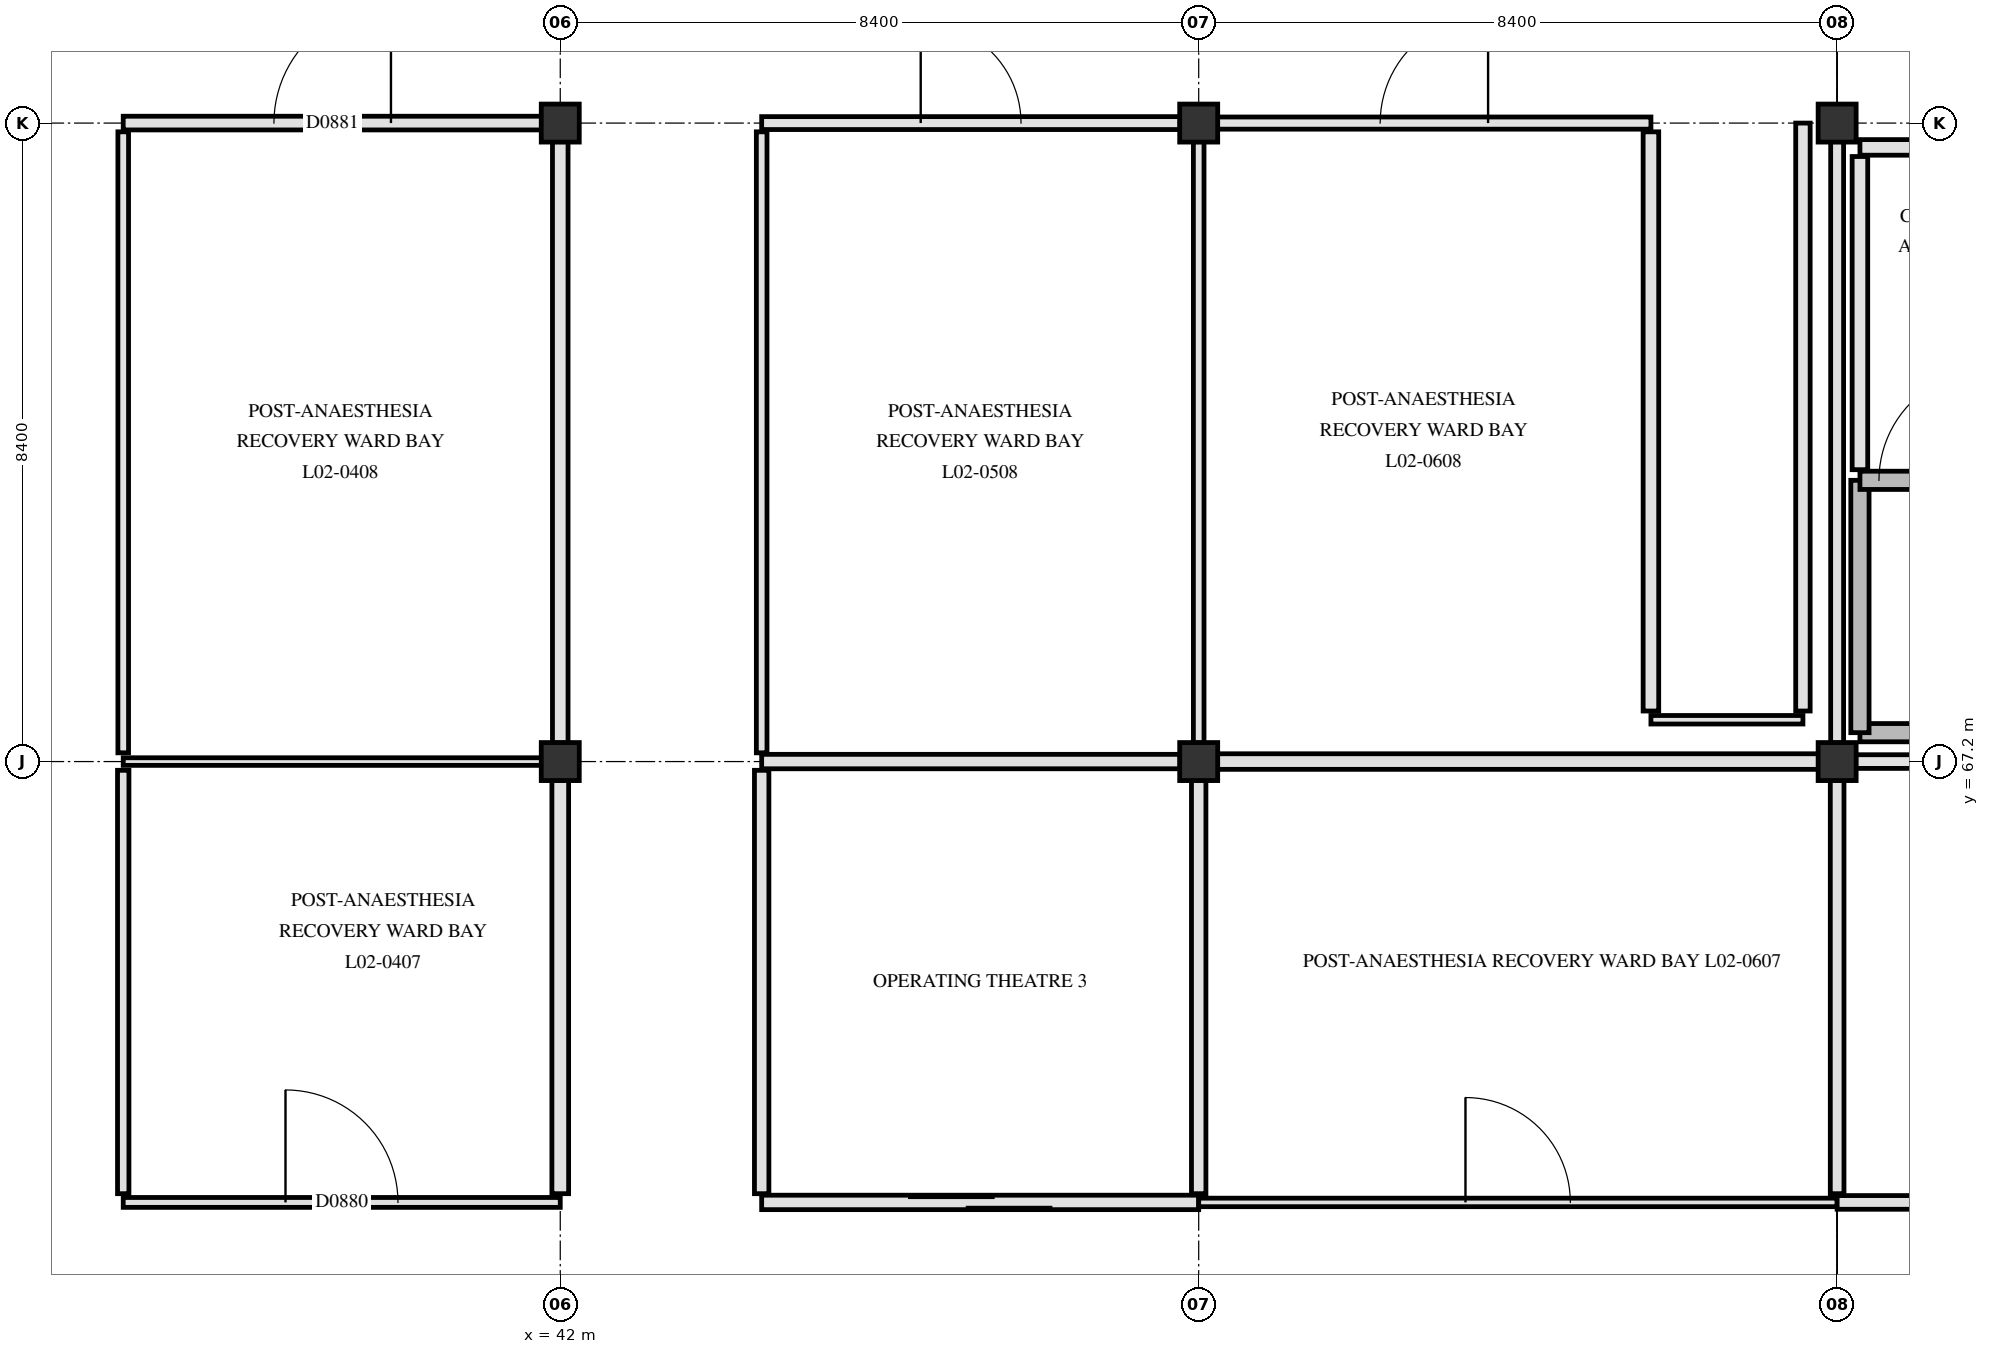
"""IFC4 building model, lengths in metres.
Left out: names, types, materials, properties, quantities, classifications, styles, units other than length and angle.
Written with IfcOpenShell. Run it as: python <this file> out.ifc"""

import sys

from ifc_helpers import new_model, si_unit, direction, frame, frame_2d, origin, origin_2d, place, context, subcontext, project, spatial, rectangle, extrude, element, fill, save


model = new_model("IFC4")
c1 = context("Model", 3, precision=1e-05, world=origin(), true_north=direction((0.0, 1.0)))
c2 = subcontext(c1, "Body", "Model", "MODEL_VIEW")
j1 = project(units=[si_unit("LENGTHUNIT", "METRE"), si_unit("PLANEANGLEUNIT", "RADIAN")], contexts=[c1])
p1 = place(None, origin())
s1 = spatial("IfcSite", under=j1, at=p1, CompositionType="ELEMENT")
p2 = place(p1, origin())
s2 = spatial("IfcBuilding", under=s1, at=p2, CompositionType="ELEMENT")
p3 = place(p2, frame((0.0, 0.0, 9.3)))
s3 = spatial("IfcBuildingStorey", under=s2, at=p3, CompositionType="ELEMENT", Elevation=9.3)
for number, where, z_axis, x_axis in (
    (1, (42.0, 67.2, 0.0), (0.0, 0.0, 1.0), (1.0, 0.0, 0.0)),
    (2, (42.0, 75.6, 0.0), (0.0, 0.0, 1.0), (1.0, 0.0, 0.0)),
    (3, (50.4, 67.2, 0.0), (0.0, 0.0, 1.0), (1.0, 0.0, 0.0)),
    (4, (50.4, 75.6, 0.0), (0.0, 0.0, 1.0), (1.0, 0.0, 0.0)),
    (5, (58.8, 67.2, 0.0), (0.0, 0.0, 1.0), (1.0, 0.0, 0.0)),
    (6, (58.8, 75.6, 0.0), (0.0, 0.0, 1.0), (1.0, 0.0, 0.0)),
):
    element("IfcColumn", number, at=place(p3, frame(where, z_axis=z_axis, x_axis=x_axis)), inside=s3, PredefinedType="COLUMN", context=c2, shape_type="SweptSolid", body=[
        extrude(rectangle(XDim=0.5, YDim=0.5, at=origin_2d()), origin(), (0.0, 0.0, 1.0), 5.1),
    ])
p4 = place(p3, frame((59.1, 67.58, 0.0), z_axis=(0.0, 0.0, 1.0), x_axis=(1.0, 0.0, 0.0)))
e7 = element("IfcWall", 7, at=p4, inside=s3, PredefinedType="SHEAR", context=c2, shape_type="SweptSolid", body=[
    extrude(rectangle(XDim=7.82, YDim=0.24, at=frame_2d((3.91, 0.0))), origin(), (0.0, 0.0, 1.0), 4.78),
])
p5 = place(p3, frame((59.1, 67.58, 0.0), z_axis=(0.0, 0.0, 1.0), x_axis=(0.0, 1.0, 0.0)))
e8 = element("IfcWall", 8, at=p5, inside=s3, PredefinedType="SHEAR", context=c2, shape_type="SweptSolid", body=[
    extrude(rectangle(XDim=3.32, YDim=0.24, at=frame_2d((1.66, 0.0))), origin(), (0.0, 0.0, 1.0), 4.78),
])
p6 = place(p3, frame((59.1, 70.9, 0.0), z_axis=(0.0, 0.0, 1.0), x_axis=(1.0, 0.0, 0.0)))
e9 = element("IfcWall", 9, at=p6, inside=s3, PredefinedType="SHEAR", context=c2, shape_type="SweptSolid", body=[
    extrude(rectangle(XDim=7.82, YDim=0.24, at=frame_2d((3.91, 0.0))), origin(), (0.0, 0.0, 1.0), 4.78),
])
p7 = place(p6, frame((0.25, 0.0, 0.0)))
e10 = element("IfcOpeningElement", 10, at=p7, cuts=e9, PredefinedType="OPENING", context=c2, shape_type="SweptSolid", body=[
    extrude(rectangle(XDim=1.45, YDim=2.2, at=frame_2d((0.725, 1.1))), frame((0.0, 0.13, 0.0), z_axis=(0.0, -1.0, 0.0), x_axis=(1.0, 0.0, 0.0)), (0.0, 0.0, 1.0), 0.26),
])
p8 = place(p3, frame((59.1, 71.04, 0.0), z_axis=(0.0, 0.0, 1.0), x_axis=(0.0, 1.0, 0.0)))
e11 = element("IfcWall", 11, at=p8, inside=s3, PredefinedType="PARTITIONING", context=c2, shape_type="SweptSolid", body=[
    extrude(rectangle(XDim=4.12, YDim=0.205, at=frame_2d((2.06, 0.0))), origin(), (0.0, 0.0, 1.0), 4.17),
])
p9 = place(p3, frame((59.1, 75.28, 0.0), z_axis=(0.0, 0.0, 1.0), x_axis=(1.0, 0.0, 0.0)))
e12 = element("IfcWall", 12, at=p9, inside=s3, PredefinedType="PARTITIONING", context=c2, shape_type="SweptSolid", body=[
    extrude(rectangle(XDim=4.18, YDim=0.205, at=frame_2d((2.09, 0.0))), origin(), (0.0, 0.0, 1.0), 4.17),
])
p10 = place(p9, frame((1.29, 0.0, 0.0)))
e13 = element("IfcOpeningElement", 13, at=p10, cuts=e12, PredefinedType="OPENING", context=c2, shape_type="SweptSolid", body=[
    extrude(rectangle(XDim=1.6, YDim=2.25, at=frame_2d((0.8, 1.125))), frame((0.0, 0.113, 0.0), z_axis=(0.0, -1.0, 0.0), x_axis=(1.0, 0.0, 0.0)), (0.0, 0.0, 1.0), 0.225),
])
p11 = place(p3, frame((36.25, 61.4, 0.0), z_axis=(0.0, 0.0, 1.0), x_axis=(1.0, 0.0, 0.0)))
e14 = element("IfcWall", 14, at=p11, inside=s3, PredefinedType="PARTITIONING", context=c2, shape_type="SweptSolid", body=[
    extrude(rectangle(XDim=5.75, YDim=0.13, at=frame_2d((2.875, 0.0))), origin(), (0.0, 0.0, 1.0), 4.17),
])
p12 = place(p11, frame((2.135, 0.0, 0.0)))
e15 = element("IfcOpeningElement", 15, at=p12, cuts=e14, PredefinedType="OPENING", context=c2, shape_type="SweptSolid", body=[
    extrude(rectangle(XDim=1.48, YDim=2.22, at=frame_2d((0.74, 1.11))), frame((0.0, 0.075, 0.0), z_axis=(0.0, -1.0, 0.0), x_axis=(1.0, 0.0, 0.0)), (0.0, 0.0, 1.0), 0.15),
])
p13 = place(p3, frame((44.65, 61.4, 0.0), z_axis=(0.0, 0.0, 1.0), x_axis=(1.0, 0.0, 0.0)))
e16 = element("IfcWall", 16, at=p13, inside=s3, PredefinedType="PARTITIONING", context=c2, shape_type="SweptSolid", body=[
    extrude(rectangle(XDim=5.75, YDim=0.19, at=frame_2d((2.875, 0.0))), origin(), (0.0, 0.0, 1.0), 4.17),
])
p14 = place(p13, frame((1.925, 0.0, 0.0)))
e17 = element("IfcOpeningElement", 17, at=p14, cuts=e16, PredefinedType="OPENING", context=c2, shape_type="SweptSolid", body=[
    extrude(rectangle(XDim=1.9, YDim=2.3, at=frame_2d((0.95, 1.15))), frame((0.0, 0.105, 0.0), z_axis=(0.0, -1.0, 0.0), x_axis=(1.0, 0.0, 0.0)), (0.0, 0.0, 1.0), 0.21),
])
p15 = place(p3, frame((50.4, 61.4, 0.0), z_axis=(0.0, 0.0, 1.0), x_axis=(1.0, 0.0, 0.0)))
e18 = element("IfcWall", 18, at=p15, inside=s3, PredefinedType="PARTITIONING", context=c2, shape_type="SweptSolid", body=[
    extrude(rectangle(XDim=8.4, YDim=0.112, at=frame_2d((4.2, 0.0))), origin(), (0.0, 0.0, 1.0), 4.17),
])
p16 = place(p15, frame((3.51, 0.0, 0.0)))
e19 = element("IfcOpeningElement", 19, at=p16, cuts=e18, PredefinedType="OPENING", context=c2, shape_type="SweptSolid", body=[
    extrude(rectangle(XDim=1.38, YDim=2.22, at=frame_2d((0.69, 1.11))), frame((0.0, 0.066, 0.0), z_axis=(0.0, -1.0, 0.0), x_axis=(1.0, 0.0, 0.0)), (0.0, 0.0, 1.0), 0.132),
])
p17 = place(p3, frame((58.8, 61.4, 0.0), z_axis=(0.0, 0.0, 1.0), x_axis=(1.0, 0.0, 0.0)))
e20 = element("IfcWall", 20, at=p17, inside=s3, PredefinedType="PARTITIONING", context=c2, shape_type="SweptSolid", body=[
    extrude(rectangle(XDim=8.4, YDim=0.18, at=frame_2d((4.2, 0.0))), origin(), (0.0, 0.0, 1.0), 4.17),
])
p18 = place(p17, frame((3.4, 0.0, 0.0)))
e21 = element("IfcOpeningElement", 21, at=p18, cuts=e20, PredefinedType="OPENING", context=c2, shape_type="SweptSolid", body=[
    extrude(rectangle(XDim=1.6, YDim=2.25, at=frame_2d((0.8, 1.125))), frame((0.0, 0.1, 0.0), z_axis=(0.0, -1.0, 0.0), x_axis=(1.0, 0.0, 0.0)), (0.0, 0.0, 1.0), 0.2),
])
p19 = place(p3, frame((36.25, 67.2, 0.0), z_axis=(0.0, 0.0, 1.0), x_axis=(1.0, 0.0, 0.0)))
e22 = element("IfcWall", 22, at=p19, inside=s3, PredefinedType="PARTITIONING", context=c2, shape_type="SweptSolid", body=[
    extrude(rectangle(XDim=5.505, YDim=0.1, at=frame_2d((2.752, 0.0))), origin(), (0.0, 0.0, 1.0), 4.02),
])
p20 = place(p3, frame((44.65, 67.2, 0.0), z_axis=(0.0, 0.0, 1.0), x_axis=(1.0, 0.0, 0.0)))
e23 = element("IfcWall", 23, at=p20, inside=s3, PredefinedType="PARTITIONING", context=c2, shape_type="SweptSolid", body=[
    extrude(rectangle(XDim=5.505, YDim=0.19, at=frame_2d((2.752, 0.0))), origin(), (0.0, 0.0, 1.0), 4.02),
])
p21 = place(p3, frame((50.645, 67.2, 0.0), z_axis=(0.0, 0.0, 1.0), x_axis=(1.0, 0.0, 0.0)))
e24 = element("IfcWall", 24, at=p21, inside=s3, PredefinedType="PARTITIONING", context=c2, shape_type="SweptSolid", body=[
    extrude(rectangle(XDim=7.91, YDim=0.205, at=frame_2d((3.955, 0.0))), origin(), (0.0, 0.0, 1.0), 4.02),
])
p22 = place(p3, frame((59.045, 67.2, 0.0), z_axis=(0.0, 0.0, 1.0), x_axis=(1.0, 0.0, 0.0)))
e25 = element("IfcWall", 25, at=p22, inside=s3, PredefinedType="PARTITIONING", context=c2, shape_type="SweptSolid", body=[
    extrude(rectangle(XDim=7.91, YDim=0.18, at=frame_2d((3.955, 0.0))), origin(), (0.0, 0.0, 1.0), 4.17),
])
p23 = place(p3, frame((56.35, 67.75, 0.0), z_axis=(0.0, 0.0, 1.0), x_axis=(1.0, 0.0, 0.0)))
e26 = element("IfcWall", 26, at=p23, inside=s3, PredefinedType="PARTITIONING", context=c2, shape_type="SweptSolid", body=[
    extrude(rectangle(XDim=2.0, YDim=0.112, at=frame_2d((1.0, 0.0))), origin(), (0.0, 0.0, 1.0), 4.77),
])
p24 = place(p3, frame((36.25, 75.6, 0.0), z_axis=(0.0, 0.0, 1.0), x_axis=(1.0, 0.0, 0.0)))
e27 = element("IfcWall", 27, at=p24, inside=s3, PredefinedType="PARTITIONING", context=c2, shape_type="SweptSolid", body=[
    extrude(rectangle(XDim=5.505, YDim=0.18, at=frame_2d((2.752, 0.0))), origin(), (0.0, 0.0, 1.0), 4.02),
])
p25 = place(p24, frame((1.982, 0.0, 0.0)))
e28 = element("IfcOpeningElement", 28, at=p25, cuts=e27, PredefinedType="OPENING", context=c2, shape_type="SweptSolid", body=[
    extrude(rectangle(XDim=1.54, YDim=2.24, at=frame_2d((0.77, 1.12))), frame((0.0, 0.1, 0.0), z_axis=(0.0, -1.0, 0.0), x_axis=(1.0, 0.0, 0.0)), (0.0, 0.0, 1.0), 0.2),
])
p26 = place(p3, frame((44.65, 75.6, 0.0), z_axis=(0.0, 0.0, 1.0), x_axis=(1.0, 0.0, 0.0)))
e29 = element("IfcWall", 29, at=p26, inside=s3, PredefinedType="PARTITIONING", context=c2, shape_type="SweptSolid", body=[
    extrude(rectangle(XDim=5.505, YDim=0.17, at=frame_2d((2.752, 0.0))), origin(), (0.0, 0.0, 1.0), 4.02),
])
p27 = place(p26, frame((2.093, 0.0, 0.0)))
e30 = element("IfcOpeningElement", 30, at=p27, cuts=e29, PredefinedType="OPENING", context=c2, shape_type="SweptSolid", body=[
    extrude(rectangle(XDim=1.32, YDim=2.18, at=frame_2d((0.66, 1.09))), frame((0.0, 0.095, 0.0), z_axis=(0.0, -1.0, 0.0), x_axis=(1.0, 0.0, 0.0)), (0.0, 0.0, 1.0), 0.19),
])
p28 = place(p3, frame((50.645, 75.6, 0.0), z_axis=(0.0, 0.0, 1.0), x_axis=(1.0, 0.0, 0.0)))
e31 = element("IfcWall", 31, at=p28, inside=s3, PredefinedType="PARTITIONING", context=c2, shape_type="SweptSolid", body=[
    extrude(rectangle(XDim=5.705, YDim=0.16, at=frame_2d((2.853, 0.0))), origin(), (0.0, 0.0, 1.0), 4.02),
])
p29 = place(p28, frame((2.143, 0.0, 0.0)))
e32 = element("IfcOpeningElement", 32, at=p29, cuts=e31, PredefinedType="OPENING", context=c2, shape_type="SweptSolid", body=[
    extrude(rectangle(XDim=1.42, YDim=2.22, at=frame_2d((0.71, 1.11))), frame((0.0, 0.09, 0.0), z_axis=(0.0, -1.0, 0.0), x_axis=(1.0, 0.0, 0.0)), (0.0, 0.0, 1.0), 0.18),
])
p30 = place(p3, frame((36.25, 61.515, 0.0), z_axis=(0.0, 0.0, 1.0), x_axis=(0.0, 1.0, 0.0)))
e33 = element("IfcWall", 33, at=p30, inside=s3, PredefinedType="PARTITIONING", context=c2, shape_type="SweptSolid", body=[
    extrude(rectangle(XDim=5.57, YDim=0.15, at=frame_2d((2.785, 0.0))), origin(), (0.0, 0.0, 1.0), 4.02),
])
p31 = place(p3, frame((36.25, 67.315, 0.0), z_axis=(0.0, 0.0, 1.0), x_axis=(0.0, 1.0, 0.0)))
e34 = element("IfcWall", 34, at=p31, inside=s3, PredefinedType="PARTITIONING", context=c2, shape_type="SweptSolid", body=[
    extrude(rectangle(XDim=8.17, YDim=0.14, at=frame_2d((4.085, 0.0))), origin(), (0.0, 0.0, 1.0), 4.02),
])
p32 = place(p3, frame((42.0, 61.515, 0.0), z_axis=(0.0, 0.0, 1.0), x_axis=(0.0, 1.0, 0.0)))
e35 = element("IfcWall", 35, at=p32, inside=s3, PredefinedType="PARTITIONING", context=c2, shape_type="SweptSolid", body=[
    extrude(rectangle(XDim=5.44, YDim=0.22, at=frame_2d((2.72, 0.0))), origin(), (0.0, 0.0, 1.0), 4.17),
])
p33 = place(p3, frame((42.0, 67.445, 0.0), z_axis=(0.0, 0.0, 1.0), x_axis=(0.0, 1.0, 0.0)))
e36 = element("IfcWall", 36, at=p33, inside=s3, PredefinedType="PARTITIONING", context=c2, shape_type="SweptSolid", body=[
    extrude(rectangle(XDim=7.91, YDim=0.205, at=frame_2d((3.955, 0.0))), origin(), (0.0, 0.0, 1.0), 4.17),
])
p34 = place(p3, frame((44.65, 61.515, 0.0), z_axis=(0.0, 0.0, 1.0), x_axis=(0.0, 1.0, 0.0)))
e37 = element("IfcWall", 37, at=p34, inside=s3, PredefinedType="PARTITIONING", context=c2, shape_type="SweptSolid", body=[
    extrude(rectangle(XDim=5.57, YDim=0.19, at=frame_2d((2.785, 0.0))), origin(), (0.0, 0.0, 1.0), 4.02),
])
p35 = place(p3, frame((44.65, 67.315, 0.0), z_axis=(0.0, 0.0, 1.0), x_axis=(0.0, 1.0, 0.0)))
e38 = element("IfcWall", 38, at=p35, inside=s3, PredefinedType="PARTITIONING", context=c2, shape_type="SweptSolid", body=[
    extrude(rectangle(XDim=8.17, YDim=0.14, at=frame_2d((4.085, 0.0))), origin(), (0.0, 0.0, 1.0), 4.02),
])
p36 = place(p3, frame((50.4, 61.515, 0.0), z_axis=(0.0, 0.0, 1.0), x_axis=(0.0, 1.0, 0.0)))
e39 = element("IfcWall", 39, at=p36, inside=s3, PredefinedType="PARTITIONING", context=c2, shape_type="SweptSolid", body=[
    extrude(rectangle(XDim=5.44, YDim=0.19, at=frame_2d((2.72, 0.0))), origin(), (0.0, 0.0, 1.0), 4.17),
])
p37 = place(p3, frame((50.4, 67.445, 0.0), z_axis=(0.0, 0.0, 1.0), x_axis=(0.0, 1.0, 0.0)))
e40 = element("IfcWall", 40, at=p37, inside=s3, PredefinedType="PARTITIONING", context=c2, shape_type="SweptSolid", body=[
    extrude(rectangle(XDim=7.91, YDim=0.14, at=frame_2d((3.955, 0.0))), origin(), (0.0, 0.0, 1.0), 4.17),
])
p38 = place(p3, frame((56.35, 67.865, 0.0), z_axis=(0.0, 0.0, 1.0), x_axis=(0.0, 1.0, 0.0)))
e41 = element("IfcWall", 41, at=p38, inside=s3, PredefinedType="PARTITIONING", context=c2, shape_type="SweptSolid", body=[
    extrude(rectangle(XDim=7.62, YDim=0.205, at=frame_2d((3.81, 0.0))), origin(), (0.0, 0.0, 1.0), 4.02),
])
p39 = place(p3, frame((58.35, 67.865, 0.0), z_axis=(0.0, 0.0, 1.0), x_axis=(0.0, 1.0, 0.0)))
e42 = element("IfcWall", 42, at=p39, inside=s3, PredefinedType="PARTITIONING", context=c2, shape_type="SweptSolid", body=[
    extrude(rectangle(XDim=7.735, YDim=0.19, at=frame_2d((3.868, 0.0))), origin(), (0.0, 0.0, 1.0), 4.02),
])
p40 = place(p3, frame((58.8, 61.515, 0.0), z_axis=(0.0, 0.0, 1.0), x_axis=(0.0, 1.0, 0.0)))
e43 = element("IfcWall", 43, at=p40, inside=s3, PredefinedType="PARTITIONING", context=c2, shape_type="SweptSolid", body=[
    extrude(rectangle(XDim=5.44, YDim=0.18, at=frame_2d((2.72, 0.0))), origin(), (0.0, 0.0, 1.0), 4.17),
])
p41 = place(p3, frame((58.8, 67.445, 0.0), z_axis=(0.0, 0.0, 1.0), x_axis=(0.0, 1.0, 0.0)))
e44 = element("IfcWall", 44, at=p41, inside=s3, PredefinedType="PARTITIONING", context=c2, shape_type="SweptSolid", body=[
    extrude(rectangle(XDim=7.91, YDim=0.17, at=frame_2d((3.955, 0.0))), origin(), (0.0, 0.0, 1.0), 4.17),
])
p42 = place(p7, origin())
e45 = element("IfcDoor", 45, at=p42, inside=s3, OperationType="SINGLE_SWING_RIGHT", PredefinedType="DOOR", context=c2, shape_type="SweptSolid", body=[
    extrude(rectangle(XDim=1.45, YDim=2.2, at=frame_2d((0.725, 1.1))), frame((0.0, 0.025, 0.0), z_axis=(0.0, -1.0, 0.0), x_axis=(1.0, 0.0, 0.0)), (0.0, 0.0, 1.0), 0.05),
])
fill(e10, e45)
p43 = place(p12, origin())
e46 = element("IfcDoor", 46, at=p43, inside=s3, OperationType="SINGLE_SWING_LEFT", PredefinedType="DOOR", context=c2, shape_type="SweptSolid", body=[
    extrude(rectangle(XDim=1.48, YDim=2.22, at=frame_2d((0.74, 1.11))), frame((0.0, 0.025, 0.0), z_axis=(0.0, -1.0, 0.0), x_axis=(1.0, 0.0, 0.0)), (0.0, 0.0, 1.0), 0.05),
])
fill(e15, e46)
p44 = place(p25, origin())
e47 = element("IfcDoor", 47, at=p44, inside=s3, OperationType="SINGLE_SWING_RIGHT", PredefinedType="DOOR", context=c2, shape_type="SweptSolid", body=[
    extrude(rectangle(XDim=1.54, YDim=2.24, at=frame_2d((0.77, 1.12))), frame((0.0, 0.025, 0.0), z_axis=(0.0, -1.0, 0.0), x_axis=(1.0, 0.0, 0.0)), (0.0, 0.0, 1.0), 0.05),
])
fill(e28, e47)
p45 = place(p14, origin())
e48 = element("IfcDoor", 48, at=p45, inside=s3, OperationType="SLIDING_TO_LEFT", PredefinedType="DOOR", context=c2, shape_type="SweptSolid", body=[
    extrude(rectangle(XDim=1.9, YDim=2.3, at=frame_2d((0.95, 1.15))), frame((0.0, 0.025, 0.0), z_axis=(0.0, -1.0, 0.0), x_axis=(1.0, 0.0, 0.0)), (0.0, 0.0, 1.0), 0.05),
])
fill(e17, e48)
p46 = place(p27, origin())
e49 = element("IfcDoor", 49, at=p46, inside=s3, OperationType="SINGLE_SWING_LEFT", PredefinedType="DOOR", context=c2, shape_type="SweptSolid", body=[
    extrude(rectangle(XDim=1.32, YDim=2.18, at=frame_2d((0.66, 1.09))), frame((0.0, 0.025, 0.0), z_axis=(0.0, -1.0, 0.0), x_axis=(1.0, 0.0, 0.0)), (0.0, 0.0, 1.0), 0.05),
])
fill(e30, e49)
p47 = place(p16, origin())
e50 = element("IfcDoor", 50, at=p47, inside=s3, OperationType="SINGLE_SWING_LEFT", PredefinedType="DOOR", context=c2, shape_type="SweptSolid", body=[
    extrude(rectangle(XDim=1.38, YDim=2.22, at=frame_2d((0.69, 1.11))), frame((0.0, 0.025, 0.0), z_axis=(0.0, -1.0, 0.0), x_axis=(1.0, 0.0, 0.0)), (0.0, 0.0, 1.0), 0.05),
])
fill(e19, e50)
p48 = place(p29, origin())
e51 = element("IfcDoor", 51, at=p48, inside=s3, OperationType="SINGLE_SWING_RIGHT", PredefinedType="DOOR", context=c2, shape_type="SweptSolid", body=[
    extrude(rectangle(XDim=1.42, YDim=2.22, at=frame_2d((0.71, 1.11))), frame((0.0, 0.025, 0.0), z_axis=(0.0, -1.0, 0.0), x_axis=(1.0, 0.0, 0.0)), (0.0, 0.0, 1.0), 0.05),
])
fill(e32, e51)
save(model, sys.argv[1])
